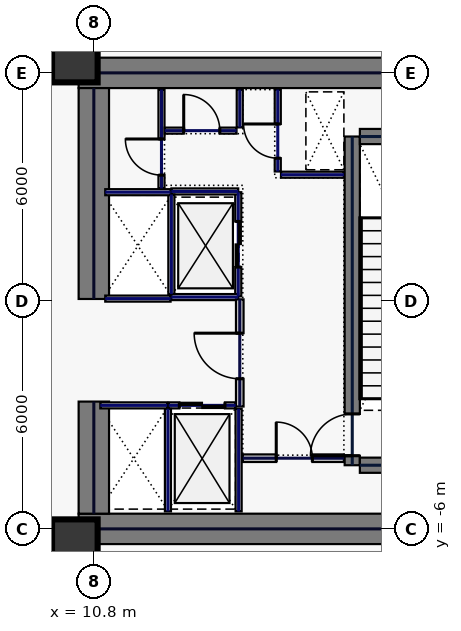
"""IFC4 building model, lengths in metres.
Left out: names, types, materials, properties, quantities, classifications, styles, units other than length and angle.
Written with IfcOpenShell. Run it as: python <this file> out.ifc"""

import sys

from ifc_helpers import new_model, si_unit, direction, frame, frame_2d, origin, origin_2d, place, context, subcontext, project, spatial, rectangle, hollow_rectangle, extrude, element, fill, save


model = new_model("IFC4")
c1 = context("Model", 3, precision=1e-05, world=origin(), true_north=direction((0.0, 1.0)))
c2 = subcontext(c1, "Body", "Model", "MODEL_VIEW")
j1 = project(units=[si_unit("LENGTHUNIT", "METRE"), si_unit("PLANEANGLEUNIT", "RADIAN")], contexts=[c1])
p1 = place(None, origin())
s1 = spatial("IfcSite", under=j1, at=p1, CompositionType="ELEMENT")
p2 = place(p1, origin())
s2 = spatial("IfcBuilding", under=s1, at=p2, CompositionType="ELEMENT")
p3 = place(p2, frame((0.0, 0.0, 8.4)))
s3 = spatial("IfcBuildingStorey", under=s2, at=p3, CompositionType="ELEMENT", Elevation=8.4)
for number, where, z_axis, x_axis in (
    (1, (10.4, 6.0, 0.0), (0.0, 0.0, 1.0), (1.0, 0.0, 0.0)),
    (2, (10.4, -6.0, 0.0), (0.0, 0.0, 1.0), (1.0, 0.0, 0.0)),
):
    element("IfcWall", number, at=place(p3, frame(where, z_axis=z_axis, x_axis=x_axis)), inside=s3, PredefinedType="SHEAR", context=c2, shape_type="SweptSolid", body=[
        extrude(rectangle(XDim=11.6, YDim=0.8, at=frame_2d((5.8, 0.0))), origin(), (0.0, 0.0, 1.0), 4.7),
    ])
p4 = place(p3, frame((10.8, -5.6, 0.0), z_axis=(0.0, 0.0, 1.0), x_axis=(0.0, 1.0, 0.0)))
e3 = element("IfcWall", 3, at=p4, inside=s3, PredefinedType="SHEAR", context=c2, shape_type="SweptSolid", body=[
    extrude(rectangle(XDim=2.95, YDim=0.8, at=frame_2d((1.475, 0.0))), origin(), (0.0, 0.0, 1.0), 4.7),
])
p5 = place(p3, frame((10.8, 0.05, 0.0), z_axis=(0.0, 0.0, 1.0), x_axis=(0.0, 1.0, 0.0)))
e4 = element("IfcWall", 4, at=p5, inside=s3, PredefinedType="SHEAR", context=c2, shape_type="SweptSolid", body=[
    extrude(rectangle(XDim=5.55, YDim=0.8, at=frame_2d((2.775, 0.0))), origin(), (0.0, 0.0, 1.0), 4.7),
])
p6 = place(p3, frame((17.6, -4.325, 0.0), z_axis=(0.0, 0.0, 1.0), x_axis=(0.0, 1.0, 0.0)))
e5 = element("IfcWall", 5, at=p6, inside=s3, PredefinedType="SHEAR", context=c2, shape_type="SweptSolid", body=[
    extrude(rectangle(XDim=8.65, YDim=0.4, at=frame_2d((4.325, 0.0))), origin(), (0.0, 0.0, 1.0), 4.7),
])
p7 = place(p6, frame((0.25, 0.0, 0.0)))
e6 = element("IfcOpeningElement", 6, at=p7, cuts=e5, PredefinedType="OPENING", context=c2, shape_type="SweptSolid", body=[
    extrude(rectangle(XDim=1.1, YDim=2.2, at=frame_2d((0.55, 1.1))), frame((0.0, 0.21, 0.0), z_axis=(0.0, -1.0, 0.0), x_axis=(1.0, 0.0, 0.0)), (0.0, 0.0, 1.0), 0.42),
])
for number, where, z_axis, x_axis in (
    (7, (17.8, -4.325, 0.0), (0.0, 0.0, 1.0), (1.0, 0.0, 0.0)),
    (8, (17.8, 4.325, 0.0), (0.0, 0.0, 1.0), (1.0, 0.0, 0.0)),
):
    element("IfcWall", number, at=place(p3, frame(where, z_axis=z_axis, x_axis=x_axis)), inside=s3, PredefinedType="SHEAR", context=c2, shape_type="SweptSolid", body=[
        extrude(rectangle(XDim=3.4, YDim=0.4, at=frame_2d((1.7, 0.0))), origin(), (0.0, 0.0, 1.0), 4.7),
    ])
for number, where, z_axis, x_axis in (
    (9, (10.3, -6.35, 0.0), (0.0, 0.0, 1.0), (1.0, 0.0, 0.0)),
    (10, (10.3, 6.35, 0.0), (0.0, 0.0, 1.0), (1.0, 0.0, 0.0)),
):
    element("IfcColumn", number, at=place(p3, frame(where, z_axis=z_axis, x_axis=x_axis)), inside=s3, PredefinedType="COLUMN", context=c2, shape_type="SweptSolid", body=[
        extrude(hollow_rectangle(XDim=1.2, YDim=1.2, WallThickness=0.05, at=origin_2d()), origin(), (0.0, 0.0, 1.0), 4.7),
    ])
p8 = place(p3, frame((14.6, 0.12, 0.0), z_axis=(0.0, 0.0, 1.0), x_axis=(0.0, 1.0, 0.0)))
e11 = element("IfcWall", 11, at=p8, inside=s3, PredefinedType="PARTITIONING", context=c2, shape_type="SweptSolid", body=[
    extrude(rectangle(XDim=2.74, YDim=0.16, at=frame_2d((1.37, 0.0))), origin(), (0.0, 0.0, 1.0), 4.7),
])
p9 = place(p8, frame((0.77, 0.0, 0.0)))
e12 = element("IfcOpeningElement", 12, at=p9, cuts=e11, PredefinedType="OPENING", context=c2, shape_type="SweptSolid", body=[
    extrude(rectangle(XDim=1.2, YDim=2.2, at=frame_2d((0.6, 1.1))), frame((0.0, 0.09, 0.0), z_axis=(0.0, -1.0, 0.0), x_axis=(1.0, 0.0, 0.0)), (0.0, 0.0, 1.0), 0.18),
])
for number, where, z_axis, x_axis in (
    (13, (12.84, 0.1, 0.0), (0.0, 0.0, 1.0), (1.0, 0.0, 0.0)),
    (14, (12.84, 2.88, 0.0), (0.0, 0.0, 1.0), (1.0, 0.0, 0.0)),
):
    element("IfcWall", number, at=place(p3, frame(where, z_axis=z_axis, x_axis=x_axis)), inside=s3, PredefinedType="PARTITIONING", context=c2, shape_type="SweptSolid", body=[
        extrude(rectangle(XDim=1.76, YDim=0.16, at=frame_2d((0.88, 0.0))), origin(), (0.0, 0.0, 1.0), 4.7),
    ])
p10 = place(p3, frame((12.84, 0.18, 0.0), z_axis=(0.0, 0.0, 1.0), x_axis=(0.0, 1.0, 0.0)))
e15 = element("IfcWall", 15, at=p10, inside=s3, PredefinedType="PARTITIONING", context=c2, shape_type="SweptSolid", body=[
    extrude(rectangle(XDim=2.62, YDim=0.16, at=frame_2d((1.31, 0.0))), origin(), (0.0, 0.0, 1.0), 4.7),
])
p11 = place(p3, frame((12.77, -2.75, 0.0), z_axis=(0.0, 0.0, 1.0), x_axis=(1.0, 0.0, 0.0)))
e16 = element("IfcWall", 16, at=p11, inside=s3, PredefinedType="PARTITIONING", context=c2, shape_type="SweptSolid", body=[
    extrude(rectangle(XDim=1.76, YDim=0.16, at=frame_2d((0.88, 0.0))), origin(), (0.0, 0.0, 1.0), 4.7),
])
p12 = place(p11, frame((0.28, 0.0, 0.0)))
e17 = element("IfcOpeningElement", 17, at=p12, cuts=e16, PredefinedType="OPENING", context=c2, shape_type="SweptSolid", body=[
    extrude(rectangle(XDim=1.2, YDim=2.2, at=frame_2d((0.6, 1.1))), frame((0.0, 0.09, 0.0), z_axis=(0.0, -1.0, 0.0), x_axis=(1.0, 0.0, 0.0)), (0.0, 0.0, 1.0), 0.18),
])
for number, where, z_axis, x_axis in (
    (18, (12.75, -5.54, 0.0), (0.0, 0.0, 1.0), (0.0, 1.0, 0.0)),
    (19, (14.61, -5.54, 0.0), (0.0, 0.0, 1.0), (0.0, 1.0, 0.0)),
):
    element("IfcWall", number, at=place(p3, frame(where, z_axis=z_axis, x_axis=x_axis)), inside=s3, PredefinedType="PARTITIONING", context=c2, shape_type="SweptSolid", body=[
        extrude(rectangle(XDim=2.7, YDim=0.16, at=frame_2d((1.35, 0.0))), origin(), (0.0, 0.0, 1.0), 4.7),
    ])
p13 = place(p3, frame((10.97, -2.75, 0.0), z_axis=(0.0, 0.0, 1.0), x_axis=(1.0, 0.0, 0.0)))
e20 = element("IfcWall", 20, at=p13, inside=s3, PredefinedType="PARTITIONING", context=c2, shape_type="SweptSolid", body=[
    extrude(rectangle(XDim=1.76, YDim=0.16, at=frame_2d((0.88, 0.0))), origin(), (0.0, 0.0, 1.0), 4.7),
])
for number, where, z_axis, x_axis in (
    (21, (11.1, 0.06, 0.0), (0.0, 0.0, 1.0), (1.0, 0.0, 0.0)),
    (22, (11.1, 2.86, 0.0), (0.0, 0.0, 1.0), (1.0, 0.0, 0.0)),
):
    element("IfcWall", number, at=place(p3, frame(where, z_axis=z_axis, x_axis=x_axis)), inside=s3, PredefinedType="PARTITIONING", context=c2, shape_type="SweptSolid", body=[
        extrude(rectangle(XDim=1.72, YDim=0.16, at=frame_2d((0.86, 0.0))), origin(), (0.0, 0.0, 1.0), 4.7),
    ])
p14 = place(p3, frame((15.64, 3.405, 0.0), z_axis=(0.0, 0.0, 1.0), x_axis=(0.0, 1.0, 0.0)))
e23 = element("IfcWall", 23, at=p14, inside=s3, PredefinedType="PARTITIONING", context=c2, shape_type="SweptSolid", body=[
    extrude(rectangle(XDim=2.155, YDim=0.16, at=frame_2d((1.078, 0.0))), origin(), (0.0, 0.0, 1.0), 4.7),
])
p15 = place(p14, frame((0.35, 0.0, 0.0)))
e24 = element("IfcOpeningElement", 24, at=p15, cuts=e23, PredefinedType="OPENING", context=c2, shape_type="SweptSolid", body=[
    extrude(rectangle(XDim=0.9, YDim=2.2, at=frame_2d((0.45, 1.1))), frame((0.0, 0.09, 0.0), z_axis=(0.0, -1.0, 0.0), x_axis=(1.0, 0.0, 0.0)), (0.0, 0.0, 1.0), 0.18),
])
p16 = place(p3, frame((15.725, 3.32, 0.0), z_axis=(0.0, 0.0, 1.0), x_axis=(1.0, 0.0, 0.0)))
e25 = element("IfcWall", 25, at=p16, inside=s3, PredefinedType="PARTITIONING", context=c2, shape_type="SweptSolid", body=[
    extrude(rectangle(XDim=1.655, YDim=0.16, at=frame_2d((0.827, 0.0))), origin(), (0.0, 0.0, 1.0), 4.7),
])
p17 = place(p3, frame((14.72, -4.14, 0.0), z_axis=(0.0, 0.0, 1.0), x_axis=(1.0, 0.0, 0.0)))
e26 = element("IfcWall", 26, at=p17, inside=s3, PredefinedType="SOLIDWALL", context=c2, shape_type="SweptSolid", body=[
    extrude(rectangle(XDim=2.66, YDim=0.2, at=frame_2d((1.33, 0.0))), origin(), (0.0, 0.0, 1.0), 4.7),
])
p18 = place(p17, frame((0.88, 0.0, 0.0)))
e27 = element("IfcOpeningElement", 27, at=p18, cuts=e26, PredefinedType="OPENING", context=c2, shape_type="SweptSolid", body=[
    extrude(rectangle(XDim=0.95, YDim=2.2, at=frame_2d((0.475, 1.1))), frame((0.0, 0.11, 0.0), z_axis=(0.0, -1.0, 0.0), x_axis=(1.0, 0.0, 0.0)), (0.0, 0.0, 1.0), 0.22),
])
p19 = place(p3, frame((12.58, 2.96, 0.0), z_axis=(0.0, 0.0, 1.0), x_axis=(0.0, 1.0, 0.0)))
e28 = element("IfcWall", 28, at=p19, inside=s3, PredefinedType="PARTITIONING", context=c2, shape_type="SweptSolid", body=[
    extrude(rectangle(XDim=2.6, YDim=0.16, at=frame_2d((1.3, 0.0))), origin(), (0.0, 0.0, 1.0), 4.7),
])
p20 = place(p19, frame((0.35, 0.0, 0.0)))
e29 = element("IfcOpeningElement", 29, at=p20, cuts=e28, PredefinedType="OPENING", context=c2, shape_type="SweptSolid", body=[
    extrude(rectangle(XDim=0.95, YDim=2.2, at=frame_2d((0.475, 1.1))), frame((0.0, 0.09, 0.0), z_axis=(0.0, -1.0, 0.0), x_axis=(1.0, 0.0, 0.0)), (0.0, 0.0, 1.0), 0.18),
])
p21 = place(p3, frame((12.665, 4.48, 0.0), z_axis=(0.0, 0.0, 1.0), x_axis=(1.0, 0.0, 0.0)))
e30 = element("IfcWall", 30, at=p21, inside=s3, PredefinedType="PARTITIONING", context=c2, shape_type="SweptSolid", body=[
    extrude(rectangle(XDim=1.89, YDim=0.16, at=frame_2d((0.945, 0.0))), origin(), (0.0, 0.0, 1.0), 4.7),
])
p22 = place(p21, frame((0.5, 0.0, 0.0)))
e31 = element("IfcOpeningElement", 31, at=p22, cuts=e30, PredefinedType="OPENING", context=c2, shape_type="SweptSolid", body=[
    extrude(rectangle(XDim=0.95, YDim=2.2, at=frame_2d((0.475, 1.1))), frame((0.0, 0.09, 0.0), z_axis=(0.0, -1.0, 0.0), x_axis=(1.0, 0.0, 0.0)), (0.0, 0.0, 1.0), 0.18),
])
p23 = place(p3, frame((14.64, 4.565, 0.0), z_axis=(0.0, 0.0, 1.0), x_axis=(0.0, 1.0, 0.0)))
e32 = element("IfcWall", 32, at=p23, inside=s3, PredefinedType="PARTITIONING", context=c2, shape_type="SweptSolid", body=[
    extrude(rectangle(XDim=0.995, YDim=0.16, at=frame_2d((0.498, 0.0))), origin(), (0.0, 0.0, 1.0), 4.7),
])
p24 = place(p3, frame((14.64, -2.78, 0.0), z_axis=(0.0, 0.0, 1.0), x_axis=(0.0, 1.0, 0.0)))
e33 = element("IfcWall", 33, at=p24, inside=s3, PredefinedType="SOLIDWALL", context=c2, shape_type="SweptSolid", body=[
    extrude(rectangle(XDim=2.82, YDim=0.2, at=frame_2d((1.41, 0.0))), origin(), (0.0, 0.0, 1.0), 4.7),
])
p25 = place(p24, frame((0.73, 0.0, 0.0)))
e34 = element("IfcOpeningElement", 34, at=p25, cuts=e33, PredefinedType="OPENING", context=c2, shape_type="SweptSolid", body=[
    extrude(rectangle(XDim=1.2, YDim=2.2, at=frame_2d((0.6, 1.1))), frame((0.0, 0.11, 0.0), z_axis=(0.0, -1.0, 0.0), x_axis=(1.0, 0.0, 0.0)), (0.0, 0.0, 1.0), 0.22),
])
for number, where, z_axis, x_axis in (
    (35, (10.58, 7.485, 0.0), (0.0, 0.0, 1.0), (0.0, -1.0, 0.0)),
    (36, (10.58, -6.42, 0.0), (0.0, 0.0, 1.0), (0.0, -1.0, 0.0)),
):
    element("IfcWall", number, at=place(p3, frame(where, z_axis=z_axis, x_axis=x_axis)), inside=s3, PredefinedType="PARTITIONING", context=c2, shape_type="SweptSolid", body=[
        extrude(rectangle(XDim=1.065, YDim=0.16, at=frame_2d((0.533, 0.0))), origin(), (0.0, 0.0, 1.0), 4.7),
    ])
p26 = place(p7, origin())
e37 = element("IfcDoor", 37, at=p26, inside=s3, OperationType="SINGLE_SWING_LEFT", PredefinedType="DOOR", context=c2, shape_type="SweptSolid", body=[
    extrude(rectangle(XDim=1.1, YDim=2.2, at=frame_2d((0.55, 1.1))), frame((0.0, 0.025, 0.0), z_axis=(0.0, -1.0, 0.0), x_axis=(1.0, 0.0, 0.0)), (0.0, 0.0, 1.0), 0.05),
])
fill(e6, e37)
p27 = place(p9, origin())
e38 = element("IfcDoor", 38, at=p27, inside=s3, OperationType="SLIDING_TO_LEFT", PredefinedType="DOOR", context=c2, shape_type="SweptSolid", body=[
    extrude(rectangle(XDim=1.2, YDim=2.2, at=frame_2d((0.6, 1.1))), frame((0.0, 0.025, 0.0), z_axis=(0.0, -1.0, 0.0), x_axis=(1.0, 0.0, 0.0)), (0.0, 0.0, 1.0), 0.05),
])
fill(e12, e38)
p28 = place(p12, origin())
e39 = element("IfcDoor", 39, at=p28, inside=s3, OperationType="SLIDING_TO_LEFT", PredefinedType="DOOR", context=c2, shape_type="SweptSolid", body=[
    extrude(rectangle(XDim=1.2, YDim=2.2, at=frame_2d((0.6, 1.1))), frame((0.0, 0.025, 0.0), z_axis=(0.0, -1.0, 0.0), x_axis=(1.0, 0.0, 0.0)), (0.0, 0.0, 1.0), 0.05),
])
fill(e17, e39)
p29 = place(p15, origin())
e40 = element("IfcDoor", 40, at=p29, inside=s3, OperationType="SINGLE_SWING_RIGHT", PredefinedType="DOOR", context=c2, shape_type="SweptSolid", body=[
    extrude(rectangle(XDim=0.9, YDim=2.2, at=frame_2d((0.45, 1.1))), frame((0.0, 0.025, 0.0), z_axis=(0.0, -1.0, 0.0), x_axis=(1.0, 0.0, 0.0)), (0.0, 0.0, 1.0), 0.05),
])
fill(e24, e40)
p30 = place(p18, origin())
e41 = element("IfcDoor", 41, at=p30, inside=s3, OperationType="SINGLE_SWING_LEFT", PredefinedType="DOOR", context=c2, shape_type="SweptSolid", body=[
    extrude(rectangle(XDim=0.95, YDim=2.2, at=frame_2d((0.475, 1.1))), frame((0.0, 0.025, 0.0), z_axis=(0.0, -1.0, 0.0), x_axis=(1.0, 0.0, 0.0)), (0.0, 0.0, 1.0), 0.05),
])
fill(e27, e41)
p31 = place(p20, origin())
e42 = element("IfcDoor", 42, at=p31, inside=s3, OperationType="SINGLE_SWING_RIGHT", PredefinedType="DOOR", context=c2, shape_type="SweptSolid", body=[
    extrude(rectangle(XDim=0.95, YDim=2.2, at=frame_2d((0.475, 1.1))), frame((0.0, 0.025, 0.0), z_axis=(0.0, -1.0, 0.0), x_axis=(1.0, 0.0, 0.0)), (0.0, 0.0, 1.0), 0.05),
])
fill(e29, e42)
p32 = place(p22, origin())
e43 = element("IfcDoor", 43, at=p32, inside=s3, OperationType="SINGLE_SWING_LEFT", PredefinedType="DOOR", context=c2, shape_type="SweptSolid", body=[
    extrude(rectangle(XDim=0.95, YDim=2.2, at=frame_2d((0.475, 1.1))), frame((0.0, 0.025, 0.0), z_axis=(0.0, -1.0, 0.0), x_axis=(1.0, 0.0, 0.0)), (0.0, 0.0, 1.0), 0.05),
])
fill(e31, e43)
p33 = place(p25, origin())
e44 = element("IfcDoor", 44, at=p33, inside=s3, OperationType="SINGLE_SWING_RIGHT", PredefinedType="DOOR", context=c2, shape_type="SweptSolid", body=[
    extrude(rectangle(XDim=1.2, YDim=2.2, at=frame_2d((0.6, 1.1))), frame((0.0, 0.025, 0.0), z_axis=(0.0, -1.0, 0.0), x_axis=(1.0, 0.0, 0.0)), (0.0, 0.0, 1.0), 0.05),
])
fill(e34, e44)
save(model, sys.argv[1])
